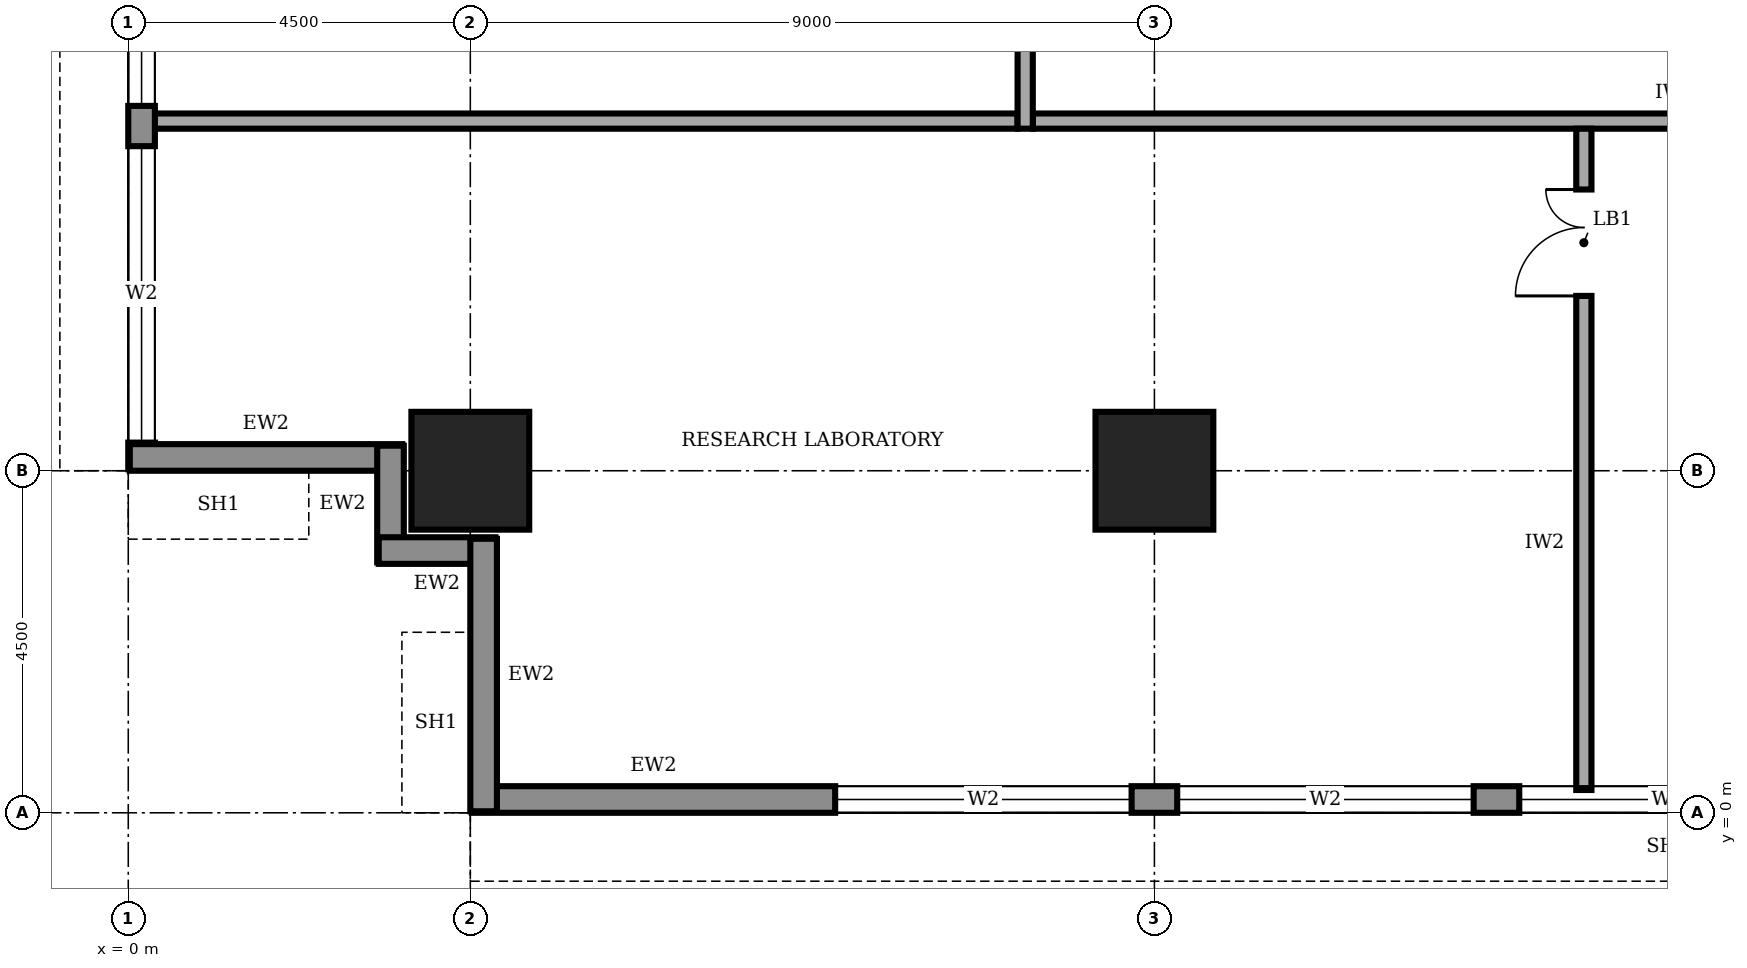
"""IFC4 building model, lengths in metres.
Left out: names, types, materials, properties, quantities, classifications, styles, units other than length and angle.
Written with IfcOpenShell. Run it as: python <this file> out.ifc"""

import sys

from ifc_helpers import new_model, si_unit, direction, frame, frame_2d, origin, origin_2d, place, context, subcontext, project, spatial, rectangle, extrude, element, fill, save


model = new_model("IFC4")
c1 = context("Model", 3, precision=1e-05, world=origin(), true_north=direction((0.0, 1.0)))
c2 = subcontext(c1, "Body", "Model", "MODEL_VIEW")
j1 = project(units=[si_unit("LENGTHUNIT", "METRE"), si_unit("PLANEANGLEUNIT", "RADIAN")], contexts=[c1])
p1 = place(None, origin())
s1 = spatial("IfcSite", under=j1, at=p1, CompositionType="ELEMENT")
p2 = place(p1, origin())
s2 = spatial("IfcBuilding", under=s1, at=p2, CompositionType="ELEMENT")
p3 = place(p2, frame((0.0, 0.0, 237.0)))
s3 = spatial("IfcBuildingStorey", under=s2, at=p3, CompositionType="ELEMENT", Elevation=237.0)
for number, where, z_axis, x_axis in (
    (1, (4.5, 4.5, 0.0), (0.0, 0.0, 1.0), (1.0, 0.0, 0.0)),
    (2, (13.5, 4.5, 0.0), (0.0, 0.0, 1.0), (1.0, 0.0, 0.0)),
):
    element("IfcColumn", number, at=place(p3, frame(where, z_axis=z_axis, x_axis=x_axis)), inside=s3, PredefinedType="COLUMN", context=c2, shape_type="SweptSolid", body=[
        extrude(rectangle(XDim=1.55, YDim=1.55, at=origin_2d()), origin(), (0.0, 0.0, 1.0), 4.0),
    ])
p4 = place(p3, frame((4.52, 0.175, 0.0), z_axis=(0.0, 0.0, 1.0), x_axis=(1.0, 0.0, 0.0)))
e3 = element("IfcWall", 3, at=p4, inside=s3, PredefinedType="STANDARD", context=c2, shape_type="SweptSolid", body=[
    extrude(rectangle(XDim=31.46, YDim=0.35, at=frame_2d((15.73, 0.0))), origin(), (0.0, 0.0, 1.0), 3.75),
])
p5 = place(p4, frame((4.78, 0.0, 0.6)))
e4 = element("IfcOpeningElement", 4, at=p5, cuts=e3, PredefinedType="OPENING", context=c2, shape_type="SweptSolid", body=[
    extrude(rectangle(XDim=3.9, YDim=2.6, at=frame_2d((1.95, 1.3))), frame((0.0, 0.185, 0.0), z_axis=(0.0, -1.0, 0.0), x_axis=(1.0, 0.0, 0.0)), (0.0, 0.0, 1.0), 0.37),
])
p6 = place(p4, frame((9.28, 0.0, 0.6)))
e5 = element("IfcOpeningElement", 5, at=p6, cuts=e3, PredefinedType="OPENING", context=c2, shape_type="SweptSolid", body=[
    extrude(rectangle(XDim=3.9, YDim=2.6, at=frame_2d((1.95, 1.3))), frame((0.0, 0.185, 0.0), z_axis=(0.0, -1.0, 0.0), x_axis=(1.0, 0.0, 0.0)), (0.0, 0.0, 1.0), 0.37),
])
p7 = place(p4, frame((13.78, 0.0, 0.6)))
e6 = element("IfcOpeningElement", 6, at=p7, cuts=e3, PredefinedType="OPENING", context=c2, shape_type="SweptSolid", body=[
    extrude(rectangle(XDim=3.9, YDim=2.6, at=frame_2d((1.95, 1.3))), frame((0.0, 0.185, 0.0), z_axis=(0.0, -1.0, 0.0), x_axis=(1.0, 0.0, 0.0)), (0.0, 0.0, 1.0), 0.37),
])
p8 = place(p4, frame((18.28, 0.0, 0.6)))
e7 = element("IfcOpeningElement", 7, at=p8, cuts=e3, PredefinedType="OPENING", context=c2, shape_type="SweptSolid", body=[
    extrude(rectangle(XDim=3.9, YDim=2.6, at=frame_2d((1.95, 1.3))), frame((0.0, 0.185, 0.0), z_axis=(0.0, -1.0, 0.0), x_axis=(1.0, 0.0, 0.0)), (0.0, 0.0, 1.0), 0.37),
])
p9 = place(p4, frame((22.78, 0.0, 0.6)))
e8 = element("IfcOpeningElement", 8, at=p9, cuts=e3, PredefinedType="OPENING", context=c2, shape_type="SweptSolid", body=[
    extrude(rectangle(XDim=3.9, YDim=2.6, at=frame_2d((1.95, 1.3))), frame((0.0, 0.185, 0.0), z_axis=(0.0, -1.0, 0.0), x_axis=(1.0, 0.0, 0.0)), (0.0, 0.0, 1.0), 0.37),
])
p10 = place(p4, frame((27.21, 0.0, 0.6)))
e9 = element("IfcOpeningElement", 9, at=p10, cuts=e3, PredefinedType="OPENING", context=c2, shape_type="SweptSolid", body=[
    extrude(rectangle(XDim=3.9, YDim=2.6, at=frame_2d((1.95, 1.3))), frame((0.0, 0.185, 0.0), z_axis=(0.0, -1.0, 0.0), x_axis=(1.0, 0.0, 0.0)), (0.0, 0.0, 1.0), 0.37),
])
p11 = place(p3, frame((0.175, 35.98, 0.0), z_axis=(0.0, 0.0, 1.0), x_axis=(0.0, -1.0, 0.0)))
e10 = element("IfcWall", 10, at=p11, inside=s3, PredefinedType="STANDARD", context=c2, shape_type="SweptSolid", body=[
    extrude(rectangle(XDim=31.46, YDim=0.35, at=frame_2d((15.73, 0.0))), origin(), (0.0, 0.0, 1.0), 3.75),
])
p12 = place(p11, frame((27.21, 0.0, 0.6)))
e11 = element("IfcOpeningElement", 11, at=p12, cuts=e10, PredefinedType="OPENING", context=c2, shape_type="SweptSolid", body=[
    extrude(rectangle(XDim=3.9, YDim=2.6, at=frame_2d((1.95, 1.3))), frame((0.0, 0.185, 0.0), z_axis=(0.0, -1.0, 0.0), x_axis=(1.0, 0.0, 0.0)), (0.0, 0.0, 1.0), 0.37),
])
p13 = place(p11, frame((22.78, 0.0, 0.6)))
e12 = element("IfcOpeningElement", 12, at=p13, cuts=e10, PredefinedType="OPENING", context=c2, shape_type="SweptSolid", body=[
    extrude(rectangle(XDim=3.9, YDim=2.6, at=frame_2d((1.95, 1.3))), frame((0.0, 0.185, 0.0), z_axis=(0.0, -1.0, 0.0), x_axis=(1.0, 0.0, 0.0)), (0.0, 0.0, 1.0), 0.37),
])
p14 = place(p11, frame((18.28, 0.0, 0.6)))
e13 = element("IfcOpeningElement", 13, at=p14, cuts=e10, PredefinedType="OPENING", context=c2, shape_type="SweptSolid", body=[
    extrude(rectangle(XDim=3.9, YDim=2.6, at=frame_2d((1.95, 1.3))), frame((0.0, 0.185, 0.0), z_axis=(0.0, -1.0, 0.0), x_axis=(1.0, 0.0, 0.0)), (0.0, 0.0, 1.0), 0.37),
])
p15 = place(p11, frame((13.78, 0.0, 0.6)))
e14 = element("IfcOpeningElement", 14, at=p15, cuts=e10, PredefinedType="OPENING", context=c2, shape_type="SweptSolid", body=[
    extrude(rectangle(XDim=3.9, YDim=2.6, at=frame_2d((1.95, 1.3))), frame((0.0, 0.185, 0.0), z_axis=(0.0, -1.0, 0.0), x_axis=(1.0, 0.0, 0.0)), (0.0, 0.0, 1.0), 0.37),
])
p16 = place(p11, frame((9.28, 0.0, 0.6)))
e15 = element("IfcOpeningElement", 15, at=p16, cuts=e10, PredefinedType="OPENING", context=c2, shape_type="SweptSolid", body=[
    extrude(rectangle(XDim=3.9, YDim=2.6, at=frame_2d((1.95, 1.3))), frame((0.0, 0.185, 0.0), z_axis=(0.0, -1.0, 0.0), x_axis=(1.0, 0.0, 0.0)), (0.0, 0.0, 1.0), 0.37),
])
p17 = place(p11, frame((4.78, 0.0, 0.6)))
e16 = element("IfcOpeningElement", 16, at=p17, cuts=e10, PredefinedType="OPENING", context=c2, shape_type="SweptSolid", body=[
    extrude(rectangle(XDim=3.9, YDim=2.6, at=frame_2d((1.95, 1.3))), frame((0.0, 0.185, 0.0), z_axis=(0.0, -1.0, 0.0), x_axis=(1.0, 0.0, 0.0)), (0.0, 0.0, 1.0), 0.37),
])
p18 = place(p3, frame((0.02, 4.675, 0.0), z_axis=(0.0, 0.0, 1.0), x_axis=(1.0, 0.0, 0.0)))
e17 = element("IfcWall", 17, at=p18, inside=s3, PredefinedType="STANDARD", context=c2, shape_type="SweptSolid", body=[
    extrude(rectangle(XDim=3.585, YDim=0.35, at=frame_2d((1.792, 0.0))), origin(), (0.0, 0.0, 1.0), 2.85),
])
for number, where, z_axis, x_axis in (
    (18, (3.45, 4.83, 0.0), (0.0, 0.0, 1.0), (0.0, -1.0, 0.0)),
    (19, (3.295, 3.45, 0.0), (0.0, 0.0, 1.0), (1.0, 0.0, 0.0)),
):
    element("IfcWall", number, at=place(p3, frame(where, z_axis=z_axis, x_axis=x_axis)), inside=s3, PredefinedType="STANDARD", context=c2, shape_type="SweptSolid", body=[
        extrude(rectangle(XDim=1.535, YDim=0.35, at=frame_2d((0.768, 0.0))), origin(), (0.0, 0.0, 1.0), 3.75),
    ])
p19 = place(p3, frame((4.675, 3.605, 0.0), z_axis=(0.0, 0.0, 1.0), x_axis=(0.0, -1.0, 0.0)))
e20 = element("IfcWall", 20, at=p19, inside=s3, PredefinedType="STANDARD", context=c2, shape_type="SweptSolid", body=[
    extrude(rectangle(XDim=3.585, YDim=0.35, at=frame_2d((1.792, 0.0))), origin(), (0.0, 0.0, 1.0), 2.85),
])
p20 = place(p3, frame((11.9, 9.1, 0.0), z_axis=(0.0, 0.0, 1.0), x_axis=(1.0, 0.0, 0.0)))
e21 = element("IfcWall", 21, at=p20, inside=s3, PredefinedType="SOLIDWALL", context=c2, shape_type="SweptSolid", body=[
    extrude(rectangle(XDim=16.9, YDim=0.2, at=frame_2d((8.45, 0.0))), origin(), (0.0, 0.0, 1.0), 3.75),
])
p21 = place(p3, frame((11.8, 32.05, 0.0), z_axis=(0.0, 0.0, 1.0), x_axis=(0.0, -1.0, 0.0)))
e22 = element("IfcWall", 22, at=p21, inside=s3, PredefinedType="SOLIDWALL", context=c2, shape_type="SweptSolid", body=[
    extrude(rectangle(XDim=23.05, YDim=0.2, at=frame_2d((11.525, 0.0))), origin(), (0.0, 0.0, 1.0), 3.75),
])
p22 = place(p21, frame((20.3, 0.0, 0.0)))
e23 = element("IfcOpeningElement", 23, at=p22, cuts=e22, PredefinedType="OPENING", context=c2, shape_type="SweptSolid", body=[
    extrude(rectangle(XDim=1.0, YDim=2.1, at=frame_2d((0.5, 1.05))), frame((0.0, 0.11, 0.0), z_axis=(0.0, -1.0, 0.0), x_axis=(1.0, 0.0, 0.0)), (0.0, 0.0, 1.0), 0.22),
])
p23 = place(p21, frame((16.2, 0.0, 0.0)))
e24 = element("IfcOpeningElement", 24, at=p23, cuts=e22, PredefinedType="OPENING", context=c2, shape_type="SweptSolid", body=[
    extrude(rectangle(XDim=0.9, YDim=2.1, at=frame_2d((0.45, 1.05))), frame((0.0, 0.11, 0.0), z_axis=(0.0, -1.0, 0.0), x_axis=(1.0, 0.0, 0.0)), (0.0, 0.0, 1.0), 0.22),
])
p24 = place(p21, frame((13.2, 0.0, 0.0)))
e25 = element("IfcOpeningElement", 25, at=p24, cuts=e22, PredefinedType="OPENING", context=c2, shape_type="SweptSolid", body=[
    extrude(rectangle(XDim=0.9, YDim=2.1, at=frame_2d((0.45, 1.05))), frame((0.0, 0.11, 0.0), z_axis=(0.0, -1.0, 0.0), x_axis=(1.0, 0.0, 0.0)), (0.0, 0.0, 1.0), 0.22),
])
p25 = place(p21, frame((8.35, 0.0, 0.0)))
e26 = element("IfcOpeningElement", 26, at=p25, cuts=e22, PredefinedType="OPENING", context=c2, shape_type="SweptSolid", body=[
    extrude(rectangle(XDim=0.9, YDim=2.1, at=frame_2d((0.45, 1.05))), frame((0.0, 0.11, 0.0), z_axis=(0.0, -1.0, 0.0), x_axis=(1.0, 0.0, 0.0)), (0.0, 0.0, 1.0), 0.22),
])
p26 = place(p21, frame((5.55, 0.0, 0.0)))
e27 = element("IfcOpeningElement", 27, at=p26, cuts=e22, PredefinedType="OPENING", context=c2, shape_type="SweptSolid", body=[
    extrude(rectangle(XDim=1.0, YDim=2.1, at=frame_2d((0.5, 1.05))), frame((0.0, 0.11, 0.0), z_axis=(0.0, -1.0, 0.0), x_axis=(1.0, 0.0, 0.0)), (0.0, 0.0, 1.0), 0.22),
])
p27 = place(p21, frame((11.05, 0.0, 0.0)))
e28 = element("IfcOpeningElement", 28, at=p27, cuts=e22, PredefinedType="OPENING", context=c2, shape_type="SweptSolid", body=[
    extrude(rectangle(XDim=1.0, YDim=2.1, at=frame_2d((0.5, 1.05))), frame((0.0, 0.11, 0.0), z_axis=(0.0, -1.0, 0.0), x_axis=(1.0, 0.0, 0.0)), (0.0, 0.0, 1.0), 0.22),
])
p28 = place(p21, frame((1.925, 0.0, 0.0)))
e29 = element("IfcOpeningElement", 29, at=p28, cuts=e22, PredefinedType="OPENING", context=c2, shape_type="SweptSolid", body=[
    extrude(rectangle(XDim=1.0, YDim=2.1, at=frame_2d((0.5, 1.05))), frame((0.0, 0.11, 0.0), z_axis=(0.0, -1.0, 0.0), x_axis=(1.0, 0.0, 0.0)), (0.0, 0.0, 1.0), 0.22),
])
p29 = place(p3, frame((19.15, 0.3, 0.0), z_axis=(0.0, 0.0, 1.0), x_axis=(0.0, 1.0, 0.0)))
e30 = element("IfcWall", 30, at=p29, inside=s3, PredefinedType="SOLIDWALL", context=c2, shape_type="SweptSolid", body=[
    extrude(rectangle(XDim=8.7, YDim=0.2, at=frame_2d((4.35, 0.0))), origin(), (0.0, 0.0, 1.0), 3.75),
])
p30 = place(p29, frame((6.5, 0.0, 0.0)))
e31 = element("IfcOpeningElement", 31, at=p30, cuts=e30, PredefinedType="OPENING", context=c2, shape_type="SweptSolid", body=[
    extrude(rectangle(XDim=1.4, YDim=2.1, at=frame_2d((0.7, 1.05))), frame((0.0, 0.11, 0.0), z_axis=(0.0, -1.0, 0.0), x_axis=(1.0, 0.0, 0.0)), (0.0, 0.0, 1.0), 0.22),
])
p31 = place(p3, frame((0.3, 9.1, 0.0), z_axis=(0.0, 0.0, 1.0), x_axis=(1.0, 0.0, 0.0)))
e32 = element("IfcWall", 32, at=p31, inside=s3, PredefinedType="SOLIDWALL", context=c2, shape_type="SweptSolid", body=[
    extrude(rectangle(XDim=11.4, YDim=0.2, at=frame_2d((5.7, 0.0))), origin(), (0.0, 0.0, 1.0), 3.75),
])
p32 = place(p5, origin())
e33 = element("IfcWindow", 33, at=p32, inside=s3, PartitioningType="SINGLE_PANEL", PredefinedType="WINDOW", context=c2, shape_type="SweptSolid", body=[
    extrude(rectangle(XDim=3.9, YDim=2.6, at=frame_2d((1.95, 1.3))), frame((0.0, 0.03, 0.0), z_axis=(0.0, -1.0, 0.0), x_axis=(1.0, 0.0, 0.0)), (0.0, 0.0, 1.0), 0.06),
])
fill(e4, e33)
p33 = place(p6, origin())
e34 = element("IfcWindow", 34, at=p33, inside=s3, PartitioningType="SINGLE_PANEL", PredefinedType="WINDOW", context=c2, shape_type="SweptSolid", body=[
    extrude(rectangle(XDim=3.9, YDim=2.6, at=frame_2d((1.95, 1.3))), frame((0.0, 0.03, 0.0), z_axis=(0.0, -1.0, 0.0), x_axis=(1.0, 0.0, 0.0)), (0.0, 0.0, 1.0), 0.06),
])
fill(e5, e34)
p34 = place(p7, origin())
e35 = element("IfcWindow", 35, at=p34, inside=s3, PartitioningType="SINGLE_PANEL", PredefinedType="WINDOW", context=c2, shape_type="SweptSolid", body=[
    extrude(rectangle(XDim=3.9, YDim=2.6, at=frame_2d((1.95, 1.3))), frame((0.0, 0.03, 0.0), z_axis=(0.0, -1.0, 0.0), x_axis=(1.0, 0.0, 0.0)), (0.0, 0.0, 1.0), 0.06),
])
fill(e6, e35)
p35 = place(p12, origin())
e36 = element("IfcWindow", 36, at=p35, inside=s3, PartitioningType="SINGLE_PANEL", PredefinedType="WINDOW", context=c2, shape_type="SweptSolid", body=[
    extrude(rectangle(XDim=3.9, YDim=2.6, at=frame_2d((1.95, 1.3))), frame((0.0, 0.03, 0.0), z_axis=(0.0, -1.0, 0.0), x_axis=(1.0, 0.0, 0.0)), (0.0, 0.0, 1.0), 0.06),
])
fill(e11, e36)
p36 = place(p13, origin())
e37 = element("IfcWindow", 37, at=p36, inside=s3, PartitioningType="SINGLE_PANEL", PredefinedType="WINDOW", context=c2, shape_type="SweptSolid", body=[
    extrude(rectangle(XDim=3.9, YDim=2.6, at=frame_2d((1.95, 1.3))), frame((0.0, 0.03, 0.0), z_axis=(0.0, -1.0, 0.0), x_axis=(1.0, 0.0, 0.0)), (0.0, 0.0, 1.0), 0.06),
])
fill(e12, e37)
p37 = place(p30, origin())
e38 = element("IfcDoor", 38, at=p37, inside=s3, OperationType="DOUBLE_DOOR_SINGLE_SWING", PredefinedType="DOOR", context=c2, shape_type="SweptSolid", body=[
    extrude(rectangle(XDim=1.4, YDim=2.1, at=frame_2d((0.7, 1.05))), frame((0.0, 0.025, 0.0), z_axis=(0.0, -1.0, 0.0), x_axis=(1.0, 0.0, 0.0)), (0.0, 0.0, 1.0), 0.05),
])
fill(e31, e38)
save(model, sys.argv[1])
